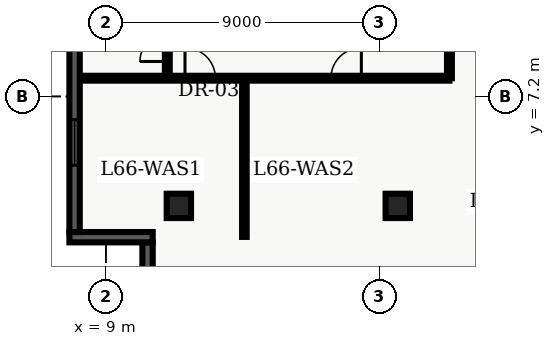
"""IFC4 building model, lengths in metres.
Left out: names, types, materials, properties, quantities, classifications, styles, units other than length and angle.
Written with IfcOpenShell. Run it as: python <this file> out.ifc"""

import sys

from ifc_helpers import new_model, entity, si_unit, converted_unit, direction, frame, origin_with_axes, origin_2d_with_axis, place, context, subcontext, project, spatial, polyline, rectangle, outline, extrude, element, fill, save


model = new_model("IFC4")
c1 = context("Model", 3, precision=1e-05, world=origin_with_axes(), true_north=direction((0.0, 1.0)))
c2 = subcontext(c1, "Body", "Model", "MODEL_VIEW")
j1 = project(units=[si_unit("LENGTHUNIT", "METRE"), converted_unit("PLANEANGLEUNIT", "DEGREE", entity("IfcPlaneAngleMeasure", 0.017), si_unit("PLANEANGLEUNIT", "RADIAN"), dimensions=[0, 0, 0, 0, 0, 0, 0])], contexts=[c1])
p1 = place(None, origin_with_axes())
s1 = spatial("IfcSite", under=j1, at=p1, CompositionType="ELEMENT")
p2 = place(p1, origin_with_axes())
s2 = spatial("IfcBuilding", under=s1, at=p2, CompositionType="ELEMENT")
p3 = place(p2, frame((0.0, 0.0, 268.5), z_axis=(0.0, 0.0, 1.0), x_axis=(1.0, 0.0, 0.0)))
s3 = spatial("IfcBuildingStorey", under=s2, at=p3, CompositionType="ELEMENT", Elevation=268.5)
for number, where, z_axis, x_axis in (
    (1, (11.4, 3.6, 0.0), (0.0, 0.0, 1.0), (1.0, 0.0, 0.0)),
    (2, (18.6, 3.6, 0.0), (0.0, 0.0, 1.0), (1.0, 0.0, 0.0)),
):
    element("IfcColumn", number, at=place(p3, frame(where, z_axis=z_axis, x_axis=x_axis)), inside=s3, PredefinedType="COLUMN", context=c2, shape_type="SweptSolid", body=[
        extrude(rectangle(XDim=0.8, YDim=0.8, at=origin_2d_with_axis()), origin_with_axes(), (0.0, 0.0, 1.0), 3.9),
    ])
p4 = place(p3, frame((8.135, 7.8, 0.0), z_axis=(0.0, 0.0, 1.0), x_axis=(1.0, 0.0, 0.0)))
e3 = element("IfcWall", 3, at=p4, inside=s3, PredefinedType="PARTITIONING", context=c2, shape_type="SweptSolid", body=[
    extrude(outline(polyline([(0.0, -0.08), (12.165, -0.08), (12.165, 0.08), (0.0, 0.08), (0.0, -0.08)])), origin_with_axes(), (0.0, 0.0, 1.0), 2.7),
])
p5 = place(p4, frame((3.967, 0.0, 0.0), z_axis=(0.0, 0.0, 1.0), x_axis=(1.0, 0.0, 0.0)))
e4 = element("IfcOpeningElement", 4, at=p5, cuts=e3, PredefinedType="OPENING", context=c2, shape_type="SweptSolid", body=[
    extrude(rectangle(XDim=1.0, YDim=0.18, at=origin_2d_with_axis()), origin_with_axes(), (0.0, 0.0, 1.0), 2.15),
])
p6 = place(p4, frame((8.768, 0.0, 0.0), z_axis=(0.0, 0.0, 1.0), x_axis=(1.0, 0.0, 0.0)))
e5 = element("IfcOpeningElement", 5, at=p6, cuts=e3, PredefinedType="OPENING", context=c2, shape_type="SweptSolid", body=[
    extrude(rectangle(XDim=1.0, YDim=0.18, at=origin_2d_with_axis()), origin_with_axes(), (0.0, 0.0, 1.0), 2.15),
])
p7 = place(p3, frame((20.3, 7.8, 0.0), z_axis=(0.0, 0.0, 1.0), x_axis=(0.0, 1.0, 0.0)))
e6 = element("IfcWall", 6, at=p7, inside=s3, PredefinedType="PARTITIONING", context=c2, shape_type="SweptSolid", body=[
    extrude(outline(polyline([(0.0, -0.08), (32.7, -0.08), (32.7, 0.08), (0.0, 0.08), (0.0, -0.08)])), origin_with_axes(), (0.0, 0.0, 1.0), 2.7),
])
p8 = place(p7, frame((14.2, 0.0, 0.0), z_axis=(0.0, 0.0, 1.0), x_axis=(1.0, 0.0, 0.0)))
e7 = element("IfcOpeningElement", 7, at=p8, cuts=e6, PredefinedType="OPENING", context=c2, shape_type="SweptSolid", body=[
    extrude(rectangle(XDim=1.0, YDim=0.18, at=origin_2d_with_axis()), origin_with_axes(), (0.0, 0.0, 1.0), 2.15),
])
p9 = place(p7, frame((18.215, 0.0, 0.0), z_axis=(0.0, 0.0, 1.0), x_axis=(1.0, 0.0, 0.0)))
e8 = element("IfcOpeningElement", 8, at=p9, cuts=e6, PredefinedType="OPENING", context=c2, shape_type="SweptSolid", body=[
    extrude(rectangle(XDim=1.0, YDim=0.18, at=origin_2d_with_axis()), origin_with_axes(), (0.0, 0.0, 1.0), 2.15),
])
p10 = place(p7, frame((22.221, 0.0, 0.0), z_axis=(0.0, 0.0, 1.0), x_axis=(1.0, 0.0, 0.0)))
e9 = element("IfcOpeningElement", 9, at=p10, cuts=e6, PredefinedType="OPENING", context=c2, shape_type="SweptSolid", body=[
    extrude(rectangle(XDim=1.0, YDim=0.18, at=origin_2d_with_axis()), origin_with_axes(), (0.0, 0.0, 1.0), 2.15),
])
p11 = place(p7, frame((25.553, 0.0, 0.0), z_axis=(0.0, 0.0, 1.0), x_axis=(1.0, 0.0, 0.0)))
e10 = element("IfcOpeningElement", 10, at=p11, cuts=e6, PredefinedType="OPENING", context=c2, shape_type="SweptSolid", body=[
    extrude(rectangle(XDim=1.0, YDim=0.18, at=origin_2d_with_axis()), origin_with_axes(), (0.0, 0.0, 1.0), 2.15),
])
p12 = place(p7, frame((5.475, 0.0, 0.0), z_axis=(0.0, 0.0, 1.0), x_axis=(1.0, 0.0, 0.0)))
e11 = element("IfcOpeningElement", 11, at=p12, cuts=e6, PredefinedType="OPENING", context=c2, shape_type="SweptSolid", body=[
    extrude(rectangle(XDim=1.05, YDim=0.18, at=origin_2d_with_axis()), origin_with_axes(), (0.0, 0.0, 1.0), 2.15),
])
p13 = place(p3, frame((11.02, 7.8, 0.0), z_axis=(0.0, 0.0, 1.0), x_axis=(0.0, 1.0, 0.0)))
e12 = element("IfcWall", 12, at=p13, inside=s3, PredefinedType="PARTITIONING", context=c2, shape_type="SweptSolid", body=[
    extrude(outline(polyline([(0.0, -0.08), (2.85, -0.08), (2.85, 0.08), (0.0, 0.08), (0.0, -0.08)])), origin_with_axes(), (0.0, 0.0, 1.0), 2.7),
])
p14 = place(p13, frame((1.0, 0.0, 0.0), z_axis=(0.0, 0.0, 1.0), x_axis=(1.0, 0.0, 0.0)))
e13 = element("IfcOpeningElement", 13, at=p14, cuts=e12, PredefinedType="OPENING", context=c2, shape_type="SweptSolid", body=[
    extrude(rectangle(XDim=0.9, YDim=0.18, at=origin_2d_with_axis()), origin_with_axes(), (0.0, 0.0, 1.0), 2.15),
])
p15 = place(p3, frame((13.555, 2.58, 0.0), z_axis=(0.0, 0.0, 1.0), x_axis=(0.0, 1.0, 0.0)))
e14 = element("IfcWall", 14, at=p15, inside=s3, PredefinedType="PARTITIONING", context=c2, shape_type="SweptSolid", body=[
    extrude(outline(polyline([(0.0, -0.075), (5.12, -0.075), (5.12, 0.075), (0.0, 0.075), (0.0, -0.075)])), origin_with_axes(), (0.0, 0.0, 1.0), 2.7),
])
p16 = place(p3, frame((10.37, 0.34, 0.0), z_axis=(0.0, 0.0, 1.0), x_axis=(0.0, 1.0, 0.0)))
e15 = element("IfcWall", 15, at=p16, inside=s3, PredefinedType="SOLIDWALL", context=c2, shape_type="SweptSolid", body=[
    extrude(outline(polyline([(0.0, -0.17), (2.06, -0.17), (2.06, 0.17), (0.0, 0.17), (0.0, -0.17)])), origin_with_axes(), (0.0, 0.0, 1.0), 3.66),
])
p17 = place(p3, frame((10.54, 2.57, 0.0), z_axis=(0.0, 0.0, 1.0), x_axis=(-1.0, 0.0, 0.0)))
e16 = element("IfcWall", 16, at=p17, inside=s3, PredefinedType="SOLIDWALL", context=c2, shape_type="SweptSolid", body=[
    extrude(outline(polyline([(0.0, -0.17), (2.74, -0.17), (2.74, 0.17), (0.0, 0.17), (0.0, -0.17)])), origin_with_axes(), (0.0, 0.0, 1.0), 3.66),
])
p18 = place(p3, frame((7.97, 2.74, 0.0), z_axis=(0.0, 0.0, 1.0), x_axis=(0.0, 1.0, 0.0)))
e17 = element("IfcWall", 17, at=p18, inside=s3, PredefinedType="SOLIDWALL", context=c2, shape_type="SweptSolid", body=[
    extrude(outline(polyline([(0.0, -0.17), (43.46, -0.17), (43.46, 0.17), (0.0, 0.17), (0.0, -0.17)])), origin_with_axes(), (0.0, 0.0, 1.0), 3.66),
])
p19 = place(p18, frame((2.948, 0.0, 0.45), z_axis=(0.0, 0.0, 1.0), x_axis=(1.0, 0.0, 0.0)))
e18 = element("IfcOpeningElement", 18, at=p19, cuts=e17, PredefinedType="OPENING", context=c2, shape_type="SweptSolid", body=[
    extrude(rectangle(XDim=1.5, YDim=0.36, at=origin_2d_with_axis()), origin_with_axes(), (0.0, 0.0, 1.0), 2.1),
])
p20 = place(p18, frame((7.643, 0.0, 0.45), z_axis=(0.0, 0.0, 1.0), x_axis=(1.0, 0.0, 0.0)))
e19 = element("IfcOpeningElement", 19, at=p20, cuts=e17, PredefinedType="OPENING", context=c2, shape_type="SweptSolid", body=[
    extrude(rectangle(XDim=1.5, YDim=0.36, at=origin_2d_with_axis()), origin_with_axes(), (0.0, 0.0, 1.0), 2.1),
])
p21 = place(p18, frame((12.339, 0.0, 0.45), z_axis=(0.0, 0.0, 1.0), x_axis=(1.0, 0.0, 0.0)))
e20 = element("IfcOpeningElement", 20, at=p21, cuts=e17, PredefinedType="OPENING", context=c2, shape_type="SweptSolid", body=[
    extrude(rectangle(XDim=1.5, YDim=0.36, at=origin_2d_with_axis()), origin_with_axes(), (0.0, 0.0, 1.0), 2.1),
])
p22 = place(p18, frame((17.034, 0.0, 0.45), z_axis=(0.0, 0.0, 1.0), x_axis=(1.0, 0.0, 0.0)))
e21 = element("IfcOpeningElement", 21, at=p22, cuts=e17, PredefinedType="OPENING", context=c2, shape_type="SweptSolid", body=[
    extrude(rectangle(XDim=1.5, YDim=0.36, at=origin_2d_with_axis()), origin_with_axes(), (0.0, 0.0, 1.0), 2.1),
])
p23 = place(p18, frame((22.58, 0.0, 0.45), z_axis=(0.0, 0.0, 1.0), x_axis=(1.0, 0.0, 0.0)))
e22 = element("IfcOpeningElement", 22, at=p23, cuts=e17, PredefinedType="OPENING", context=c2, shape_type="SweptSolid", body=[
    extrude(rectangle(XDim=1.5, YDim=0.36, at=origin_2d_with_axis()), origin_with_axes(), (0.0, 0.0, 1.0), 2.1),
])
p24 = place(p18, frame((26.426, 0.0, 0.45), z_axis=(0.0, 0.0, 1.0), x_axis=(1.0, 0.0, 0.0)))
e23 = element("IfcOpeningElement", 23, at=p24, cuts=e17, PredefinedType="OPENING", context=c2, shape_type="SweptSolid", body=[
    extrude(rectangle(XDim=1.5, YDim=0.36, at=origin_2d_with_axis()), origin_with_axes(), (0.0, 0.0, 1.0), 2.1),
])
p25 = place(p18, frame((31.121, 0.0, 0.45), z_axis=(0.0, 0.0, 1.0), x_axis=(1.0, 0.0, 0.0)))
e24 = element("IfcOpeningElement", 24, at=p25, cuts=e17, PredefinedType="OPENING", context=c2, shape_type="SweptSolid", body=[
    extrude(rectangle(XDim=1.5, YDim=0.36, at=origin_2d_with_axis()), origin_with_axes(), (0.0, 0.0, 1.0), 2.1),
])
p26 = place(p18, frame((35.817, 0.0, 0.45), z_axis=(0.0, 0.0, 1.0), x_axis=(1.0, 0.0, 0.0)))
e25 = element("IfcOpeningElement", 25, at=p26, cuts=e17, PredefinedType="OPENING", context=c2, shape_type="SweptSolid", body=[
    extrude(rectangle(XDim=1.5, YDim=0.36, at=origin_2d_with_axis()), origin_with_axes(), (0.0, 0.0, 1.0), 2.1),
])
p27 = place(p18, frame((40.512, 0.0, 0.45), z_axis=(0.0, 0.0, 1.0), x_axis=(1.0, 0.0, 0.0)))
e26 = element("IfcOpeningElement", 26, at=p27, cuts=e17, PredefinedType="OPENING", context=c2, shape_type="SweptSolid", body=[
    extrude(rectangle(XDim=1.5, YDim=0.36, at=origin_2d_with_axis()), origin_with_axes(), (0.0, 0.0, 1.0), 2.1),
])
p28 = place(p13, frame((1.0, 0.0, 0.0), z_axis=(0.0, 0.0, 1.0), x_axis=(1.0, 0.0, 0.0)))
e27 = element("IfcDoor", 27, at=p28, inside=s3, OperationType="SINGLE_SWING_LEFT", PredefinedType="DOOR", context=c2, shape_type="SweptSolid", body=[
    extrude(rectangle(XDim=0.9, YDim=0.09, at=origin_2d_with_axis()), origin_with_axes(), (0.0, 0.0, 1.0), 2.15),
])
fill(e13, e27)
p29 = place(p4, frame((3.967, 0.0, 0.0), z_axis=(0.0, 0.0, 1.0), x_axis=(1.0, 0.0, 0.0)))
e28 = element("IfcDoor", 28, at=p29, inside=s3, OperationType="SINGLE_SWING_LEFT", PredefinedType="DOOR", context=c2, shape_type="SweptSolid", body=[
    extrude(rectangle(XDim=1.0, YDim=0.09, at=origin_2d_with_axis()), origin_with_axes(), (0.0, 0.0, 1.0), 2.15),
])
fill(e4, e28)
p30 = place(p4, frame((8.768, 0.0, 0.0), z_axis=(0.0, 0.0, 1.0), x_axis=(1.0, 0.0, 0.0)))
e29 = element("IfcDoor", 29, at=p30, inside=s3, OperationType="SINGLE_SWING_RIGHT", PredefinedType="DOOR", context=c2, shape_type="SweptSolid", body=[
    extrude(rectangle(XDim=1.0, YDim=0.09, at=origin_2d_with_axis()), origin_with_axes(), (0.0, 0.0, 1.0), 2.15),
])
fill(e5, e29)
p31 = place(p18, frame((2.948, 0.0, 0.45), z_axis=(0.0, 0.0, 1.0), x_axis=(1.0, 0.0, 0.0)))
e30 = element("IfcWindow", 30, at=p31, inside=s3, PredefinedType="WINDOW", context=c2, shape_type="SweptSolid", body=[
    extrude(rectangle(XDim=1.5, YDim=0.09, at=origin_2d_with_axis()), origin_with_axes(), (0.0, 0.0, 1.0), 2.1),
])
fill(e18, e30)
save(model, sys.argv[1])
